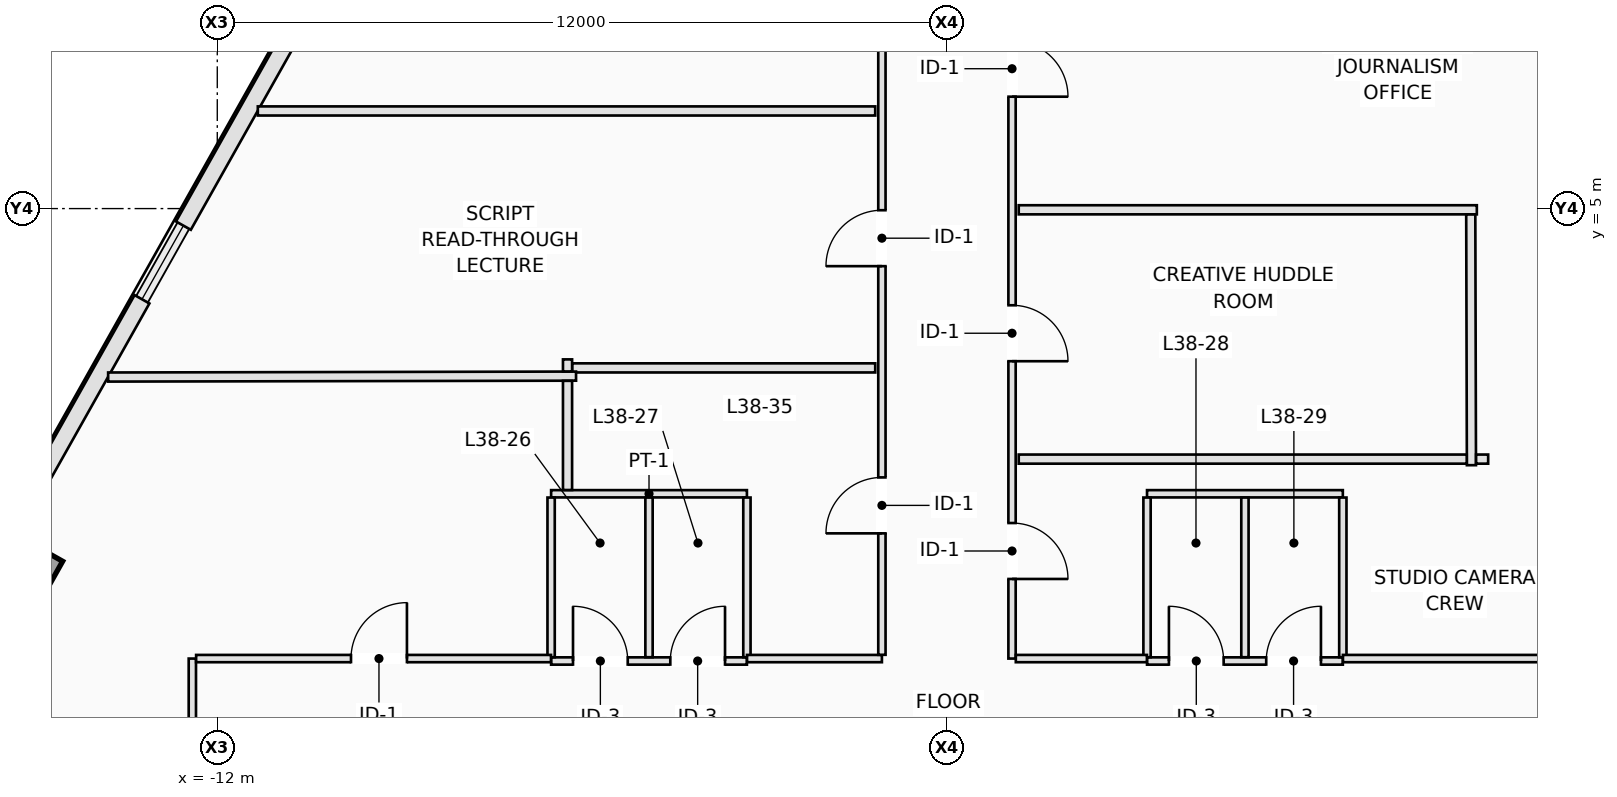
"""IFC4 building model, lengths in metres.
Left out: names, types, materials, properties, quantities, classifications, styles, units other than length and angle.
Written with IfcOpenShell. Run it as: python <this file> out.ifc"""

import sys

from ifc_helpers import new_model, si_unit, direction, frame, frame_2d, origin, origin_2d, place, context, subcontext, project, spatial, rectangle, extrude, element, fill, save


model = new_model("IFC4")
c1 = context("Model", 3, precision=1e-05, world=origin(), true_north=direction((0.0, 1.0)))
c2 = subcontext(c1, "Body", "Model", "MODEL_VIEW")
j1 = project(units=[si_unit("LENGTHUNIT", "METRE"), si_unit("PLANEANGLEUNIT", "RADIAN")], contexts=[c1])
p1 = place(None, origin())
s1 = spatial("IfcSite", under=j1, at=p1, CompositionType="ELEMENT")
p2 = place(p1, origin())
s2 = spatial("IfcBuilding", under=s1, at=p2, CompositionType="ELEMENT")
p3 = place(p2, frame((0.0, 0.0, 140.5)))
s3 = spatial("IfcBuildingStorey", under=s2, at=p3, CompositionType="ELEMENT", Elevation=140.5)
p4 = place(p3, frame((-15.224, -0.991, 0.0), z_axis=(0.0, 0.0, 1.0), x_axis=(-0.871575139605, 0.490261946333, 0.0)))
e1 = element("IfcColumn", 1, at=p4, inside=s3, PredefinedType="COLUMN", context=c2, shape_type="SweptSolid", body=[
    extrude(rectangle(XDim=1.0, YDim=1.0, at=origin_2d()), origin(), (0.0, 0.0, 1.0), 3.5),
])
p5 = place(p3, frame((-15.383, -0.305, 0.0), z_axis=(0.0, 0.0, 1.0), x_axis=(0.490232095789, 0.871591929895, 0.0)))
e2 = element("IfcWall", 2, at=p5, inside=s3, PredefinedType="STANDARD", context=c2, shape_type="SweptSolid", body=[
    extrude(rectangle(XDim=4.375, YDim=0.28, at=frame_2d((2.188, 0.0))), origin(), (0.0, 0.0, 1.0), 3.25),
])
p6 = place(p3, frame((-12.557, 4.72, 0.0), z_axis=(0.0, 0.0, 1.0), x_axis=(0.490274486291, 0.871568085747, 0.0)))
e3 = element("IfcWall", 3, at=p6, inside=s3, PredefinedType="STANDARD", context=c2, shape_type="SweptSolid", body=[
    extrude(rectangle(XDim=4.375, YDim=0.28, at=frame_2d((2.188, 0.0))), origin(), (0.0, 0.0, 1.0), 3.25),
])
p7 = place(p3, frame((-6.51, -2.44, 0.0), z_axis=(0.0, 0.0, 1.0), x_axis=(1.0, 0.0, 0.0)))
e4 = element("IfcWall", 4, at=p7, inside=s3, PredefinedType="PARTITIONING", context=c2, shape_type="SweptSolid", body=[
    extrude(rectangle(XDim=3.22, YDim=0.12, at=frame_2d((1.61, 0.0))), origin(), (0.0, 0.0, 1.0), 2.891),
])
p8 = place(p7, frame((0.36, 0.0, 0.0)))
e5 = element("IfcOpeningElement", 5, at=p8, cuts=e4, PredefinedType="OPENING", context=c2, shape_type="SweptSolid", body=[
    extrude(rectangle(XDim=0.9, YDim=2.12, at=frame_2d((0.45, 1.06))), frame((0.0, 0.07, 0.0), z_axis=(0.0, -1.0, 0.0), x_axis=(1.0, 0.0, 0.0)), (0.0, 0.0, 1.0), 0.14),
])
p9 = place(p7, frame((1.96, 0.0, 0.0)))
e6 = element("IfcOpeningElement", 6, at=p9, cuts=e4, PredefinedType="OPENING", context=c2, shape_type="SweptSolid", body=[
    extrude(rectangle(XDim=0.9, YDim=2.12, at=frame_2d((0.45, 1.06))), frame((0.0, 0.07, 0.0), z_axis=(0.0, -1.0, 0.0), x_axis=(1.0, 0.0, 0.0)), (0.0, 0.0, 1.0), 0.14),
])
p10 = place(p3, frame((-6.51, 0.31, 0.0), z_axis=(0.0, 0.0, 1.0), x_axis=(1.0, 0.0, 0.0)))
e7 = element("IfcWall", 7, at=p10, inside=s3, PredefinedType="PARTITIONING", context=c2, shape_type="SweptSolid", body=[
    extrude(rectangle(XDim=3.22, YDim=0.12, at=frame_2d((1.61, 0.0))), origin(), (0.0, 0.0, 1.0), 3.25),
])
for number, where, z_axis, x_axis in (
    (8, (-6.51, -2.378, 0.0), (0.0, 0.0, 1.0), (0.0, 1.0, 0.0)),
    (9, (-4.9, -2.378, 0.0), (0.0, 0.0, 1.0), (0.0, 1.0, 0.0)),
    (10, (-3.29, -2.378, 0.0), (0.0, 0.0, 1.0), (0.0, 1.0, 0.0)),
):
    element("IfcWall", number, at=place(p3, frame(where, z_axis=z_axis, x_axis=x_axis)), inside=s3, PredefinedType="PARTITIONING", context=c2, shape_type="SweptSolid", body=[
        extrude(rectangle(XDim=2.626, YDim=0.12, at=frame_2d((1.313, 0.0))), origin(), (0.0, 0.0, 1.0), 3.25),
    ])
p11 = place(p3, frame((3.29, -2.44, 0.0), z_axis=(0.0, 0.0, 1.0), x_axis=(1.0, 0.0, 0.0)))
e11 = element("IfcWall", 11, at=p11, inside=s3, PredefinedType="PARTITIONING", context=c2, shape_type="SweptSolid", body=[
    extrude(rectangle(XDim=3.22, YDim=0.12, at=frame_2d((1.61, 0.0))), origin(), (0.0, 0.0, 1.0), 2.891),
])
p12 = place(p11, frame((0.36, 0.0, 0.0)))
e12 = element("IfcOpeningElement", 12, at=p12, cuts=e11, PredefinedType="OPENING", context=c2, shape_type="SweptSolid", body=[
    extrude(rectangle(XDim=0.9, YDim=2.12, at=frame_2d((0.45, 1.06))), frame((0.0, 0.07, 0.0), z_axis=(0.0, -1.0, 0.0), x_axis=(1.0, 0.0, 0.0)), (0.0, 0.0, 1.0), 0.14),
])
p13 = place(p11, frame((1.96, 0.0, 0.0)))
e13 = element("IfcOpeningElement", 13, at=p13, cuts=e11, PredefinedType="OPENING", context=c2, shape_type="SweptSolid", body=[
    extrude(rectangle(XDim=0.9, YDim=2.12, at=frame_2d((0.45, 1.06))), frame((0.0, 0.07, 0.0), z_axis=(0.0, -1.0, 0.0), x_axis=(1.0, 0.0, 0.0)), (0.0, 0.0, 1.0), 0.14),
])
p14 = place(p3, frame((3.29, 0.31, 0.0), z_axis=(0.0, 0.0, 1.0), x_axis=(1.0, 0.0, 0.0)))
e14 = element("IfcWall", 14, at=p14, inside=s3, PredefinedType="PARTITIONING", context=c2, shape_type="SweptSolid", body=[
    extrude(rectangle(XDim=3.22, YDim=0.12, at=frame_2d((1.61, 0.0))), origin(), (0.0, 0.0, 1.0), 3.25),
])
for number, where, z_axis, x_axis in (
    (15, (3.29, -2.378, 0.0), (0.0, 0.0, 1.0), (0.0, 1.0, 0.0)),
    (16, (4.9, -2.378, 0.0), (0.0, 0.0, 1.0), (0.0, 1.0, 0.0)),
    (17, (6.51, -2.378, 0.0), (0.0, 0.0, 1.0), (0.0, 1.0, 0.0)),
):
    element("IfcWall", number, at=place(p3, frame(where, z_axis=z_axis, x_axis=x_axis)), inside=s3, PredefinedType="PARTITIONING", context=c2, shape_type="SweptSolid", body=[
        extrude(rectangle(XDim=2.626, YDim=0.12, at=frame_2d((1.313, 0.0))), origin(), (0.0, 0.0, 1.0), 3.25),
    ])
p15 = place(p3, frame((-12.41, -4.248, 0.0), z_axis=(0.0, 0.0, 1.0), x_axis=(0.0, 1.0, 0.0)))
e18 = element("IfcWall", 18, at=p15, inside=s3, PredefinedType="PARTITIONING", context=c2, shape_type="SweptSolid", body=[
    extrude(rectangle(XDim=1.848, YDim=0.12, at=frame_2d((0.924, 0.0))), origin(), (0.0, 0.0, 1.0), 3.25),
])
p16 = place(p3, frame((-12.348, -2.4, 0.0), z_axis=(0.0, 0.0, 1.0), x_axis=(1.0, 0.0, 0.0)))
e19 = element("IfcWall", 19, at=p16, inside=s3, PredefinedType="PARTITIONING", context=c2, shape_type="SweptSolid", body=[
    extrude(rectangle(XDim=5.836, YDim=0.12, at=frame_2d((2.918, 0.0))), origin(), (0.0, 0.0, 1.0), 3.25),
])
p17 = place(p16, frame((2.547, 0.0, 0.0)))
e20 = element("IfcOpeningElement", 20, at=p17, cuts=e19, PredefinedType="OPENING", context=c2, shape_type="SweptSolid", body=[
    extrude(rectangle(XDim=0.92, YDim=2.12, at=frame_2d((0.46, 1.06))), frame((0.0, 0.07, 0.0), z_axis=(0.0, -1.0, 0.0), x_axis=(1.0, 0.0, 0.0)), (0.0, 0.0, 1.0), 0.14),
])
p18 = place(p3, frame((-3.288, -2.4, 0.0), z_axis=(0.0, 0.0, 1.0), x_axis=(1.0, 0.0, 0.0)))
e21 = element("IfcWall", 21, at=p18, inside=s3, PredefinedType="PARTITIONING", context=c2, shape_type="SweptSolid", body=[
    extrude(rectangle(XDim=2.218, YDim=0.12, at=frame_2d((1.109, 0.0))), origin(), (0.0, 0.0, 1.0), 2.891),
])
p19 = place(p3, frame((-1.07, -2.338, 0.0), z_axis=(0.0, 0.0, 1.0), x_axis=(0.0, 1.0, 0.0)))
e22 = element("IfcWall", 22, at=p19, inside=s3, PredefinedType="PARTITIONING", context=c2, shape_type="SweptSolid", body=[
    extrude(rectangle(XDim=13.488, YDim=0.12, at=frame_2d((6.744, 0.0))), origin(), (0.0, 0.0, 1.0), 3.25),
])
p20 = place(p19, frame((10.646, 0.0, 0.0)))
e23 = element("IfcOpeningElement", 23, at=p20, cuts=e22, PredefinedType="OPENING", context=c2, shape_type="SweptSolid", body=[
    extrude(rectangle(XDim=0.92, YDim=2.12, at=frame_2d((0.46, 1.06))), frame((0.0, 0.07, 0.0), z_axis=(0.0, -1.0, 0.0), x_axis=(1.0, 0.0, 0.0)), (0.0, 0.0, 1.0), 0.14),
])
p21 = place(p19, frame((6.391, 0.0, 0.0)))
e24 = element("IfcOpeningElement", 24, at=p21, cuts=e22, PredefinedType="OPENING", context=c2, shape_type="SweptSolid", body=[
    extrude(rectangle(XDim=0.92, YDim=2.12, at=frame_2d((0.46, 1.06))), frame((0.0, 0.07, 0.0), z_axis=(0.0, -1.0, 0.0), x_axis=(1.0, 0.0, 0.0)), (0.0, 0.0, 1.0), 0.14),
])
p22 = place(p19, frame((1.997, 0.0, 0.0)))
e25 = element("IfcOpeningElement", 25, at=p22, cuts=e22, PredefinedType="OPENING", context=c2, shape_type="SweptSolid", body=[
    extrude(rectangle(XDim=0.92, YDim=2.12, at=frame_2d((0.46, 1.06))), frame((0.0, 0.07, 0.0), z_axis=(0.0, -1.0, 0.0), x_axis=(1.0, 0.0, 0.0)), (0.0, 0.0, 1.0), 0.14),
])
p23 = place(p3, frame((1.07, 11.088, 0.0), z_axis=(0.0, 0.0, 1.0), x_axis=(0.0, -1.0, 0.0)))
e26 = element("IfcWall", 26, at=p23, inside=s3, PredefinedType="PARTITIONING", context=c2, shape_type="SweptSolid", body=[
    extrude(rectangle(XDim=13.488, YDim=0.12, at=frame_2d((6.744, 0.0))), origin(), (0.0, 0.0, 1.0), 3.25),
])
p24 = place(p23, frame((3.328, 0.0, 0.0)))
e27 = element("IfcOpeningElement", 27, at=p24, cuts=e26, PredefinedType="OPENING", context=c2, shape_type="SweptSolid", body=[
    extrude(rectangle(XDim=0.92, YDim=2.12, at=frame_2d((0.46, 1.06))), frame((0.0, 0.07, 0.0), z_axis=(0.0, -1.0, 0.0), x_axis=(1.0, 0.0, 0.0)), (0.0, 0.0, 1.0), 0.14),
])
p25 = place(p23, frame((7.678, 0.0, 0.0)))
e28 = element("IfcOpeningElement", 28, at=p25, cuts=e26, PredefinedType="OPENING", context=c2, shape_type="SweptSolid", body=[
    extrude(rectangle(XDim=0.92, YDim=2.12, at=frame_2d((0.46, 1.06))), frame((0.0, 0.07, 0.0), z_axis=(0.0, -1.0, 0.0), x_axis=(1.0, 0.0, 0.0)), (0.0, 0.0, 1.0), 0.14),
])
p26 = place(p23, frame((11.259, 0.0, 0.0)))
e29 = element("IfcOpeningElement", 29, at=p26, cuts=e26, PredefinedType="OPENING", context=c2, shape_type="SweptSolid", body=[
    extrude(rectangle(XDim=0.92, YDim=2.12, at=frame_2d((0.46, 1.06))), frame((0.0, 0.07, 0.0), z_axis=(0.0, -1.0, 0.0), x_axis=(1.0, 0.0, 0.0)), (0.0, 0.0, 1.0), 0.14),
])
p27 = place(p3, frame((1.132, -2.4, 0.0), z_axis=(0.0, 0.0, 1.0), x_axis=(1.0, 0.0, 0.0)))
e30 = element("IfcWall", 30, at=p27, inside=s3, PredefinedType="PARTITIONING", context=c2, shape_type="SweptSolid", body=[
    extrude(rectangle(XDim=2.156, YDim=0.12, at=frame_2d((1.078, 0.0))), origin(), (0.0, 0.0, 1.0), 2.891),
])
p28 = place(p3, frame((6.512, -2.4, 0.0), z_axis=(0.0, 0.0, 1.0), x_axis=(1.0, 0.0, 0.0)))
e31 = element("IfcWall", 31, at=p28, inside=s3, PredefinedType="PARTITIONING", context=c2, shape_type="SweptSolid", body=[
    extrude(rectangle(XDim=5.898, YDim=0.12, at=frame_2d((2.949, 0.0))), origin(), (0.0, 0.0, 1.0), 3.25),
])
p29 = place(p3, frame((-1.18, 6.605, 0.0), z_axis=(0.0, 0.0, 1.0), x_axis=(-1.0, 0.0, 0.0)))
e32 = element("IfcWall", 32, at=p29, inside=s3, PredefinedType="PARTITIONING", context=c2, shape_type="SweptSolid", body=[
    extrude(rectangle(XDim=10.153, YDim=0.15, at=frame_2d((5.077, 0.0))), origin(), (0.0, 0.0, 1.0), 2.891),
])
p30 = place(p3, frame((8.714, 4.98, 0.0), z_axis=(0.0, 0.0, 1.0), x_axis=(-1.0, 0.0, 0.0)))
e33 = element("IfcWall", 33, at=p30, inside=s3, PredefinedType="PARTITIONING", context=c2, shape_type="SweptSolid", body=[
    extrude(rectangle(XDim=7.534, YDim=0.15, at=frame_2d((3.767, 0.0))), origin(), (0.0, 0.0, 1.0), 3.25),
])
p31 = place(p3, frame((8.625, 0.78, 0.0), z_axis=(0.0, 0.0, 1.0), x_axis=(-0.002664604467, 0.999996449935, 0.0)))
e34 = element("IfcWall", 34, at=p31, inside=s3, PredefinedType="PARTITIONING", context=c2, shape_type="SweptSolid", body=[
    extrude(rectangle(XDim=4.123, YDim=0.15, at=frame_2d((2.062, 0.0))), origin(), (0.0, 0.0, 1.0), 3.25),
])
p32 = place(p3, frame((-1.18, 2.38, 0.0), z_axis=(0.0, 0.0, 1.0), x_axis=(-1.0, 0.0, 0.0)))
e35 = element("IfcWall", 35, at=p32, inside=s3, PredefinedType="PARTITIONING", context=c2, shape_type="SweptSolid", body=[
    extrude(rectangle(XDim=4.985, YDim=0.15, at=frame_2d((2.492, 0.0))), origin(), (0.0, 0.0, 1.0), 3.25),
])
p33 = place(p3, frame((-6.1, 2.245, 0.0), z_axis=(0.0, 0.0, 1.0), x_axis=(-0.999998126996, -0.001935459776, 0.0)))
e36 = element("IfcWall", 36, at=p33, inside=s3, PredefinedType="PARTITIONING", context=c2, shape_type="SweptSolid", body=[
    extrude(rectangle(XDim=7.695, YDim=0.15, at=frame_2d((3.847, 0.0))), origin(), (0.0, 0.0, 1.0), 3.25),
])
p34 = place(p3, frame((8.9, 0.88, 0.0), z_axis=(0.0, 0.0, 1.0), x_axis=(-1.0, 0.0, 0.0)))
e37 = element("IfcWall", 37, at=p34, inside=s3, PredefinedType="PARTITIONING", context=c2, shape_type="SweptSolid", body=[
    extrude(rectangle(XDim=0.198, YDim=0.15, at=frame_2d((0.099, 0.0))), origin(), (0.0, 0.0, 1.0), 3.25),
])
p35 = place(p3, frame((8.548, 0.88, 0.0), z_axis=(0.0, 0.0, 1.0), x_axis=(-1.0, 0.0, 0.0)))
e38 = element("IfcWall", 38, at=p35, inside=s3, PredefinedType="PARTITIONING", context=c2, shape_type="SweptSolid", body=[
    extrude(rectangle(XDim=7.368, YDim=0.15, at=frame_2d((3.684, 0.0))), origin(), (0.0, 0.0, 1.0), 3.25),
])
p36 = place(p3, frame((-6.24, 0.372, 0.0), z_axis=(0.0, 0.0, 1.0), x_axis=(0.0, 1.0, 0.0)))
e39 = element("IfcWall", 39, at=p36, inside=s3, PredefinedType="PARTITIONING", context=c2, shape_type="SweptSolid", body=[
    extrude(rectangle(XDim=1.795, YDim=0.15, at=frame_2d((0.898, 0.0))), origin(), (0.0, 0.0, 1.0), 3.25),
])
p37 = place(p3, frame((-6.24, 2.321, 0.0), z_axis=(0.0, 0.0, 1.0), x_axis=(0.0, 1.0, 0.0)))
e40 = element("IfcWall", 40, at=p37, inside=s3, PredefinedType="PARTITIONING", context=c2, shape_type="SweptSolid", body=[
    extrude(rectangle(XDim=0.199, YDim=0.15, at=frame_2d((0.099, 0.0))), origin(), (0.0, 0.0, 1.0), 3.25),
])
p38 = place(p8, origin())
e41 = element("IfcDoor", 41, at=p38, inside=s3, OperationType="SINGLE_SWING_LEFT", PredefinedType="DOOR", context=c2, shape_type="SweptSolid", body=[
    extrude(rectangle(XDim=0.9, YDim=2.12, at=frame_2d((0.45, 1.06))), frame((0.0, 0.025, 0.0), z_axis=(0.0, -1.0, 0.0), x_axis=(1.0, 0.0, 0.0)), (0.0, 0.0, 1.0), 0.05),
])
fill(e5, e41)
p39 = place(p9, origin())
e42 = element("IfcDoor", 42, at=p39, inside=s3, OperationType="SINGLE_SWING_RIGHT", PredefinedType="DOOR", context=c2, shape_type="SweptSolid", body=[
    extrude(rectangle(XDim=0.9, YDim=2.12, at=frame_2d((0.45, 1.06))), frame((0.0, 0.025, 0.0), z_axis=(0.0, -1.0, 0.0), x_axis=(1.0, 0.0, 0.0)), (0.0, 0.0, 1.0), 0.05),
])
fill(e6, e42)
p40 = place(p12, origin())
e43 = element("IfcDoor", 43, at=p40, inside=s3, OperationType="SINGLE_SWING_LEFT", PredefinedType="DOOR", context=c2, shape_type="SweptSolid", body=[
    extrude(rectangle(XDim=0.9, YDim=2.12, at=frame_2d((0.45, 1.06))), frame((0.0, 0.025, 0.0), z_axis=(0.0, -1.0, 0.0), x_axis=(1.0, 0.0, 0.0)), (0.0, 0.0, 1.0), 0.05),
])
fill(e12, e43)
p41 = place(p13, origin())
e44 = element("IfcDoor", 44, at=p41, inside=s3, OperationType="SINGLE_SWING_RIGHT", PredefinedType="DOOR", context=c2, shape_type="SweptSolid", body=[
    extrude(rectangle(XDim=0.9, YDim=2.12, at=frame_2d((0.45, 1.06))), frame((0.0, 0.025, 0.0), z_axis=(0.0, -1.0, 0.0), x_axis=(1.0, 0.0, 0.0)), (0.0, 0.0, 1.0), 0.05),
])
fill(e13, e44)
p42 = place(p24, origin())
e45 = element("IfcDoor", 45, at=p42, inside=s3, OperationType="SINGLE_SWING_RIGHT", PredefinedType="DOOR", context=c2, shape_type="SweptSolid", body=[
    extrude(rectangle(XDim=0.92, YDim=2.12, at=frame_2d((0.46, 1.06))), frame((0.0, 0.025, 0.0), z_axis=(0.0, -1.0, 0.0), x_axis=(1.0, 0.0, 0.0)), (0.0, 0.0, 1.0), 0.05),
])
fill(e27, e45)
p43 = place(p21, origin())
e46 = element("IfcDoor", 46, at=p43, inside=s3, OperationType="SINGLE_SWING_LEFT", PredefinedType="DOOR", context=c2, shape_type="SweptSolid", body=[
    extrude(rectangle(XDim=0.92, YDim=2.12, at=frame_2d((0.46, 1.06))), frame((0.0, 0.025, 0.0), z_axis=(0.0, -1.0, 0.0), x_axis=(1.0, 0.0, 0.0)), (0.0, 0.0, 1.0), 0.05),
])
fill(e24, e46)
p44 = place(p25, origin())
e47 = element("IfcDoor", 47, at=p44, inside=s3, OperationType="SINGLE_SWING_RIGHT", PredefinedType="DOOR", context=c2, shape_type="SweptSolid", body=[
    extrude(rectangle(XDim=0.92, YDim=2.12, at=frame_2d((0.46, 1.06))), frame((0.0, 0.025, 0.0), z_axis=(0.0, -1.0, 0.0), x_axis=(1.0, 0.0, 0.0)), (0.0, 0.0, 1.0), 0.05),
])
fill(e28, e47)
p45 = place(p22, origin())
e48 = element("IfcDoor", 48, at=p45, inside=s3, OperationType="SINGLE_SWING_LEFT", PredefinedType="DOOR", context=c2, shape_type="SweptSolid", body=[
    extrude(rectangle(XDim=0.92, YDim=2.12, at=frame_2d((0.46, 1.06))), frame((0.0, 0.025, 0.0), z_axis=(0.0, -1.0, 0.0), x_axis=(1.0, 0.0, 0.0)), (0.0, 0.0, 1.0), 0.05),
])
fill(e25, e48)
p46 = place(p26, origin())
e49 = element("IfcDoor", 49, at=p46, inside=s3, OperationType="SINGLE_SWING_RIGHT", PredefinedType="DOOR", context=c2, shape_type="SweptSolid", body=[
    extrude(rectangle(XDim=0.92, YDim=2.12, at=frame_2d((0.46, 1.06))), frame((0.0, 0.025, 0.0), z_axis=(0.0, -1.0, 0.0), x_axis=(1.0, 0.0, 0.0)), (0.0, 0.0, 1.0), 0.05),
])
fill(e29, e49)
p47 = place(p17, origin())
e50 = element("IfcDoor", 50, at=p47, inside=s3, OperationType="SINGLE_SWING_RIGHT", PredefinedType="DOOR", context=c2, shape_type="SweptSolid", body=[
    extrude(rectangle(XDim=0.92, YDim=2.12, at=frame_2d((0.46, 1.06))), frame((0.0, 0.025, 0.0), z_axis=(0.0, -1.0, 0.0), x_axis=(1.0, 0.0, 0.0)), (0.0, 0.0, 1.0), 0.05),
])
fill(e20, e50)
save(model, sys.argv[1])
